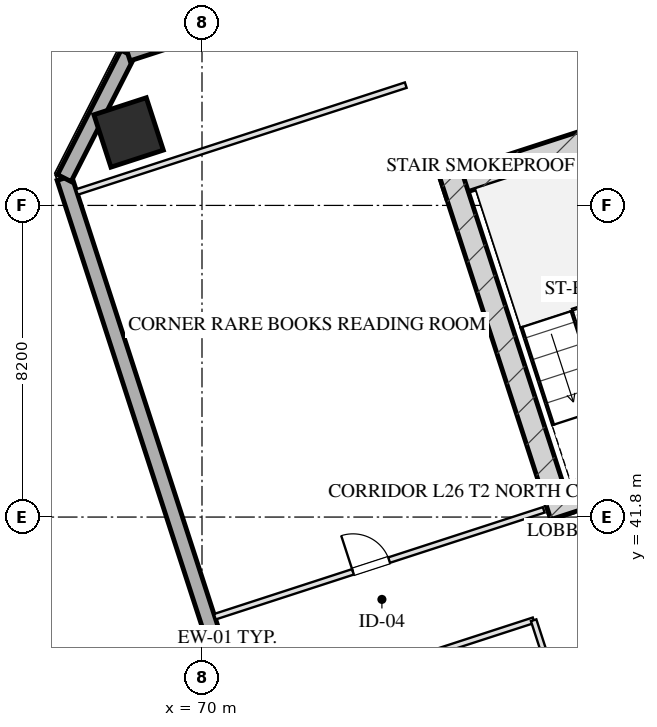
"""IFC4 building model, lengths in metres.
Left out: names, types, materials, properties, quantities, classifications, styles, units other than length and angle.
Written with IfcOpenShell. Run it as: python <this file> out.ifc"""

import sys

from ifc_helpers import new_model, si_unit, direction, frame, frame_2d, origin, origin_2d, place, context, subcontext, project, spatial, rectangle, hollow_rectangle, extrude, element, fill, save


model = new_model("IFC4")
c1 = context("Model", 3, precision=1e-05, world=origin(), true_north=direction((0.0, 1.0)))
c2 = subcontext(c1, "Body", "Model", "MODEL_VIEW")
j1 = project(units=[si_unit("LENGTHUNIT", "METRE"), si_unit("PLANEANGLEUNIT", "RADIAN")], contexts=[c1])
p1 = place(None, origin())
s1 = spatial("IfcSite", under=j1, at=p1, CompositionType="ELEMENT")
p2 = place(p1, origin())
s2 = spatial("IfcBuilding", under=s1, at=p2, CompositionType="ELEMENT")
p3 = place(p2, frame((0.0, 0.0, 103.5)))
s3 = spatial("IfcBuildingStorey", under=s2, at=p3, CompositionType="ELEMENT", Elevation=103.5)
p4 = place(p3, frame((76.344, 50.466, 0.0), z_axis=(0.0, 0.0, 1.0), x_axis=(0.951055727519, 0.309019421968, 0.0)))
e1 = element("IfcWall", 1, at=p4, inside=s3, PredefinedType="SHEAR", context=c2, shape_type="SweptSolid", body=[
    extrude(rectangle(XDim=16.4, YDim=0.6, at=frame_2d((8.2, 0.0))), origin(), (0.0, 0.0, 1.0), 3.45),
])
p5 = place(p3, frame((79.466, 41.828, 0.0), z_axis=(0.0, 0.0, 1.0), x_axis=(-0.309041232772, 0.951048640421, 0.0)))
e2 = element("IfcWall", 2, at=p5, inside=s3, PredefinedType="SHEAR", context=c2, shape_type="SweptSolid", body=[
    extrude(rectangle(XDim=9.48, YDim=0.6, at=frame_2d((4.74, 0.0))), origin(), (0.0, 0.0, 1.0), 3.45),
])
p6 = place(p3, frame((79.087, 42.021, 0.0), z_axis=(0.0, 0.0, 1.0), x_axis=(0.951062550203, 0.3089984233, 0.0)))
e3 = element("IfcWall", 3, at=p6, inside=s3, PredefinedType="SHEAR", context=c2, shape_type="SweptSolid", body=[
    extrude(rectangle(XDim=4.22, YDim=0.6, at=frame_2d((2.11, 0.0))), origin(), (0.0, 0.0, 1.0), 3.45),
])
p7 = place(p3, frame((68.069, 51.92, 0.0), z_axis=(0.0, 0.0, 1.0), x_axis=(0.951056516295, 0.309016994375, 0.0)))
e4 = element("IfcColumn", 4, at=p7, inside=s3, PredefinedType="COLUMN", context=c2, shape_type="SweptSolid", body=[
    extrude(hollow_rectangle(XDim=1.45, YDim=1.45, WallThickness=0.05, at=origin_2d()), origin(), (0.0, 0.0, 1.0), 3.451),
])
p8 = place(p3, frame((80.716, 6.59, 0.0), z_axis=(0.0, 0.0, 1.0), x_axis=(-0.309017542002, 0.95105633836, 0.0)))
e5 = element("IfcWall", 5, at=p8, inside=s3, PredefinedType="SOLIDWALL", context=c2, shape_type="SweptSolid", body=[
    extrude(rectangle(XDim=46.4, YDim=0.4, at=frame_2d((23.2, 0.0))), origin(), (0.0, 0.0, 1.0), 2.61),
])
p9 = place(p8, frame((24.6, 0.0, 0.75)))
e6 = element("IfcOpeningElement", 6, at=p9, cuts=e5, PredefinedType="OPENING", context=c2, shape_type="SweptSolid", body=[
    extrude(rectangle(XDim=2.4, YDim=1.46, at=frame_2d((1.2, 0.73))), frame((0.0, 0.21, 0.0), z_axis=(0.0, -1.0, 0.0), x_axis=(1.0, 0.0, 0.0)), (0.0, 0.0, 1.0), 0.42),
])
p10 = place(p8, frame((28.4, 0.0, 0.75)))
e7 = element("IfcOpeningElement", 7, at=p10, cuts=e5, PredefinedType="OPENING", context=c2, shape_type="SweptSolid", body=[
    extrude(rectangle(XDim=2.4, YDim=1.46, at=frame_2d((1.2, 0.73))), frame((0.0, 0.21, 0.0), z_axis=(0.0, -1.0, 0.0), x_axis=(1.0, 0.0, 0.0)), (0.0, 0.0, 1.0), 0.42),
])
p11 = place(p8, frame((16.77, 0.0, 0.0)))
e8 = element("IfcOpeningElement", 8, at=p11, cuts=e5, PredefinedType="OPENING", context=c2, shape_type="SweptSolid", body=[
    extrude(rectangle(XDim=1.1, YDim=2.15, at=frame_2d((0.55, 1.075))), frame((0.0, 0.21, 0.0), z_axis=(0.0, -1.0, 0.0), x_axis=(1.0, 0.0, 0.0)), (0.0, 0.0, 1.0), 0.42),
])
p12 = place(p3, frame((66.377, 50.719, 0.0), z_axis=(0.0, 0.0, 1.0), x_axis=(0.454026238093, 0.890988313685, 0.0)))
e9 = element("IfcWall", 9, at=p12, inside=s3, PredefinedType="SOLIDWALL", context=c2, shape_type="SweptSolid", body=[
    extrude(rectangle(XDim=3.677, YDim=0.4, at=frame_2d((1.838, 0.0))), origin(), (0.0, 0.0, 1.0), 2.61),
])
p13 = place(p3, frame((68.047, 53.995, 0.0), z_axis=(0.0, 0.0, 1.0), x_axis=(0.95105505922, 0.309021478754, 0.0)))
e10 = element("IfcWall", 10, at=p13, inside=s3, PredefinedType="SOLIDWALL", context=c2, shape_type="SweptSolid", body=[
    extrude(rectangle(XDim=29.4, YDim=0.4, at=frame_2d((14.7, 0.0))), origin(), (0.0, 0.0, 1.0), 2.61),
])
p14 = place(p3, frame((66.707, 50.352, 0.0), z_axis=(0.0, 0.0, 1.0), x_axis=(0.951057133767, 0.309015093986, 0.0)))
e11 = element("IfcWall", 11, at=p14, inside=s3, PredefinedType="PARTITIONING", context=c2, shape_type="SweptSolid", body=[
    extrude(rectangle(XDim=9.1, YDim=0.15, at=frame_2d((4.55, 0.0))), origin(), (0.0, 0.0, 1.0), 3.175),
])
p15 = place(p3, frame((70.338, 39.177, 0.0), z_axis=(0.0, 0.0, 1.0), x_axis=(0.951059695568, 0.309007209409, 0.0)))
e12 = element("IfcWall", 12, at=p15, inside=s3, PredefinedType="PARTITIONING", context=c2, shape_type="SweptSolid", body=[
    extrude(rectangle(XDim=9.1, YDim=0.15, at=frame_2d((4.55, 0.0))), origin(), (0.0, 0.0, 1.0), 3.175),
])
p16 = place(p15, frame((3.822, 0.0, 0.0)))
e13 = element("IfcOpeningElement", 13, at=p16, cuts=e12, PredefinedType="OPENING", context=c2, shape_type="SweptSolid", body=[
    extrude(rectangle(XDim=1.0, YDim=2.05, at=frame_2d((0.5, 1.025))), frame((0.0, 0.085, 0.0), z_axis=(0.0, -1.0, 0.0), x_axis=(1.0, 0.0, 0.0)), (0.0, 0.0, 1.0), 0.17),
])
p17 = place(p3, frame((71.166, 36.629, 0.0), z_axis=(0.0, 0.0, 1.0), x_axis=(0.951060470027, 0.309004825775, 0.0)))
e14 = element("IfcWall", 14, at=p17, inside=s3, PredefinedType="PARTITIONING", context=c2, shape_type="SweptSolid", body=[
    extrude(rectangle(XDim=7.95, YDim=0.15, at=frame_2d((3.975, 0.0))), origin(), (0.0, 0.0, 1.0), 3.175),
])
p18 = place(p3, frame((83.869, 23.26, 0.0), z_axis=(0.0, 0.0, 1.0), x_axis=(-0.309022042254, 0.951054876125, 0.0)))
e15 = element("IfcWall", 15, at=p18, inside=s3, PredefinedType="PARTITIONING", context=c2, shape_type="SweptSolid", body=[
    extrude(rectangle(XDim=16.64, YDim=0.15, at=frame_2d((8.32, 0.0))), origin(), (0.0, 0.0, 1.0), 3.175),
])
p19 = place(p18, frame((1.58, 0.0, 0.0)))
e16 = element("IfcOpeningElement", 16, at=p19, cuts=e15, PredefinedType="OPENING", context=c2, shape_type="SweptSolid", body=[
    extrude(rectangle(XDim=1.05, YDim=2.05, at=frame_2d((0.525, 1.025))), frame((0.0, 0.085, 0.0), z_axis=(0.0, -1.0, 0.0), x_axis=(1.0, 0.0, 0.0)), (0.0, 0.0, 1.0), 0.17),
])
p20 = place(p18, frame((6.08, 0.0, 0.0)))
e17 = element("IfcOpeningElement", 17, at=p20, cuts=e15, PredefinedType="OPENING", context=c2, shape_type="SweptSolid", body=[
    extrude(rectangle(XDim=1.0, YDim=2.05, at=frame_2d((0.5, 1.025))), frame((0.0, 0.085, 0.0), z_axis=(0.0, -1.0, 0.0), x_axis=(1.0, 0.0, 0.0)), (0.0, 0.0, 1.0), 0.17),
])
p21 = place(p18, frame((10.406, 0.0, 0.0)))
e18 = element("IfcOpeningElement", 18, at=p21, cuts=e15, PredefinedType="OPENING", context=c2, shape_type="SweptSolid", body=[
    extrude(rectangle(XDim=1.0, YDim=2.05, at=frame_2d((0.5, 1.025))), frame((0.0, 0.085, 0.0), z_axis=(0.0, -1.0, 0.0), x_axis=(1.0, 0.0, 0.0)), (0.0, 0.0, 1.0), 0.17),
])
p22 = place(p18, frame((14.226, 0.0, 0.0)))
e19 = element("IfcOpeningElement", 19, at=p22, cuts=e15, PredefinedType="OPENING", context=c2, shape_type="SweptSolid", body=[
    extrude(rectangle(XDim=0.85, YDim=2.05, at=frame_2d((0.425, 1.025))), frame((0.0, 0.085, 0.0), z_axis=(0.0, -1.0, 0.0), x_axis=(1.0, 0.0, 0.0)), (0.0, 0.0, 1.0), 0.17),
])
p23 = place(p16, origin())
e20 = element("IfcDoor", 20, at=p23, inside=s3, OperationType="SINGLE_SWING_LEFT", PredefinedType="DOOR", context=c2, shape_type="SweptSolid", body=[
    extrude(rectangle(XDim=1.0, YDim=2.05, at=frame_2d((0.5, 1.025))), frame((0.0, 0.025, 0.0), z_axis=(0.0, -1.0, 0.0), x_axis=(1.0, 0.0, 0.0)), (0.0, 0.0, 1.0), 0.05),
])
fill(e13, e20)
save(model, sys.argv[1])
